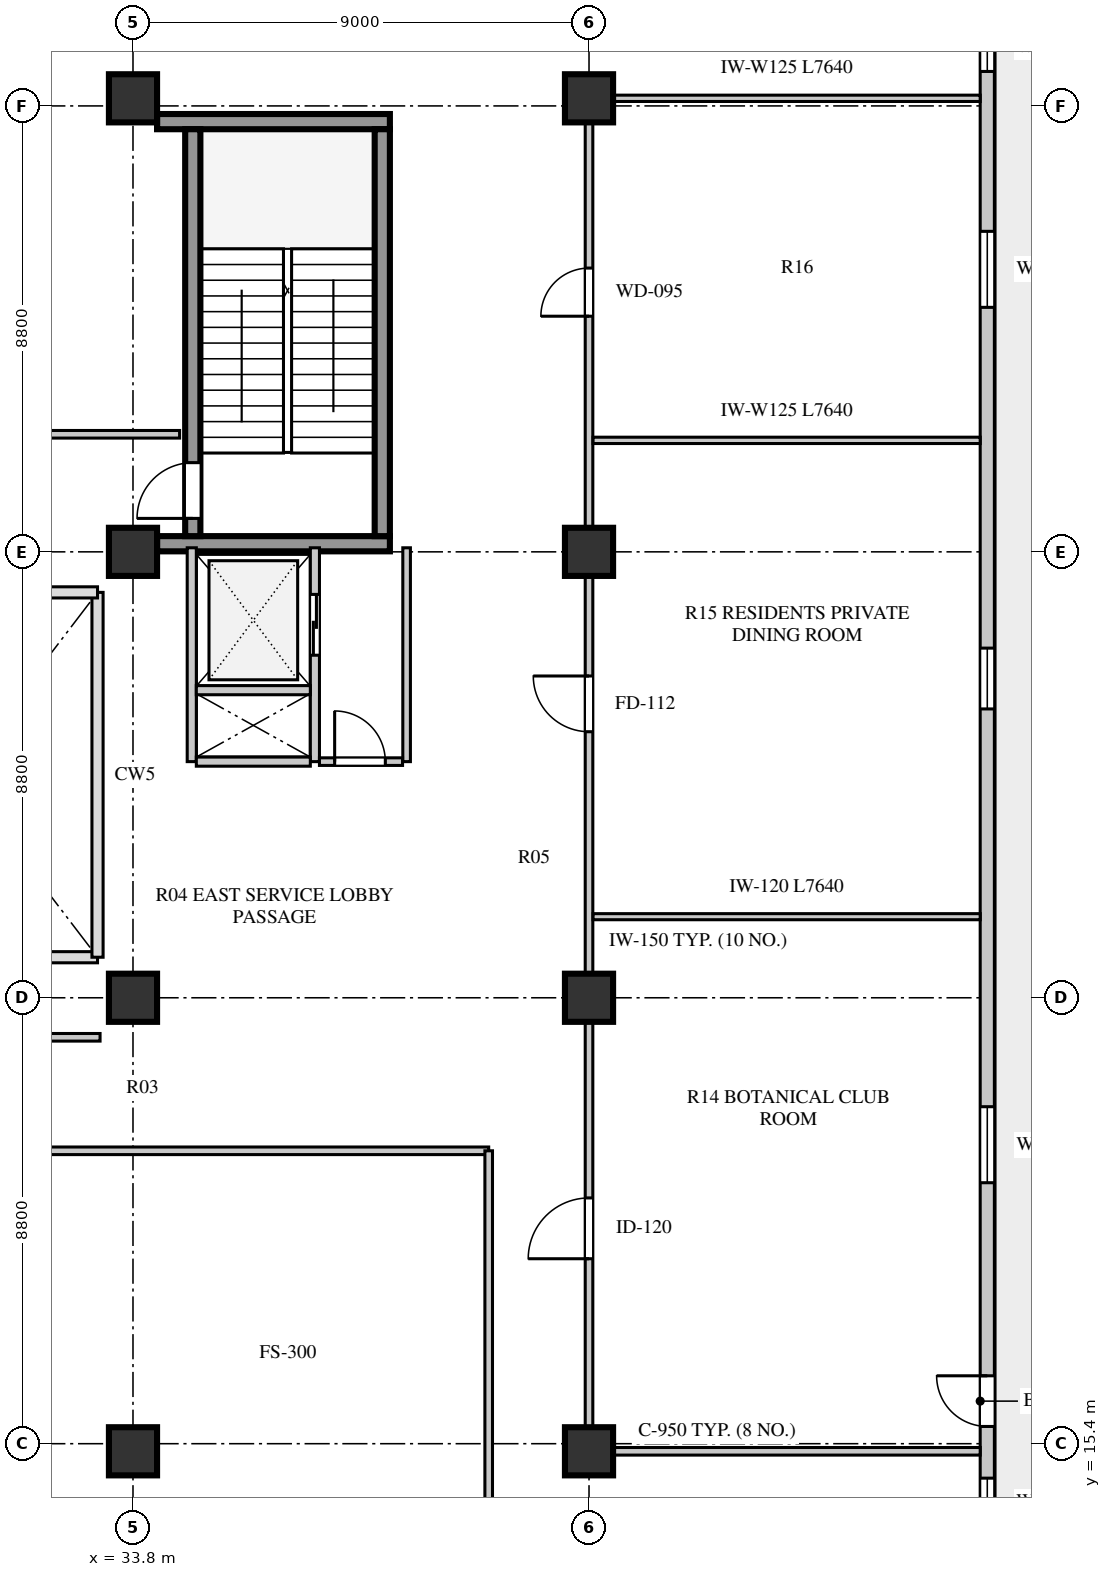
"""IFC4 building model, lengths in metres.
Left out: names, types, materials, properties, quantities, classifications, styles, units other than length and angle.
Written with IfcOpenShell. Run it as: python <this file> out.ifc"""

import sys

from ifc_helpers import new_model, si_unit, direction, frame, frame_2d, origin, origin_2d, place, context, subcontext, project, spatial, rectangle, extrude, element, fill, save


model = new_model("IFC4")
c1 = context("Model", 3, precision=1e-05, world=origin(), true_north=direction((0.0, 1.0)))
c2 = subcontext(c1, "Body", "Model", "MODEL_VIEW")
j1 = project(units=[si_unit("LENGTHUNIT", "METRE"), si_unit("PLANEANGLEUNIT", "RADIAN")], contexts=[c1])
p1 = place(None, origin())
s1 = spatial("IfcSite", under=j1, at=p1, CompositionType="ELEMENT")
p2 = place(p1, origin())
s2 = spatial("IfcBuilding", under=s1, at=p2, CompositionType="ELEMENT")
p3 = place(p2, frame((0.0, 0.0, 208.9)))
s3 = spatial("IfcBuildingStorey", under=s2, at=p3, CompositionType="ELEMENT", Elevation=208.9)
for number, where, z_axis, x_axis in (
    (1, (34.275, 33.16, 0.0), (0.0, 0.0, 1.0), (1.0, 0.0, 0.0)),
    (2, (34.275, 41.49, 0.0), (0.0, 0.0, 1.0), (1.0, 0.0, 0.0)),
):
    element("IfcWall", number, at=place(p3, frame(where, z_axis=z_axis, x_axis=x_axis)), inside=s3, PredefinedType="SHEAR", context=c2, shape_type="SweptSolid", body=[
        extrude(rectangle(XDim=4.595, YDim=0.3, at=frame_2d((2.298, 0.0))), origin(), (0.0, 0.0, 1.0), 4.96),
    ])
p4 = place(p3, frame((34.98, 33.31, 0.0), z_axis=(0.0, 0.0, 1.0), x_axis=(0.0, 1.0, 0.0)))
e3 = element("IfcWall", 3, at=p4, inside=s3, PredefinedType="SHEAR", context=c2, shape_type="SweptSolid", body=[
    extrude(rectangle(XDim=8.03, YDim=0.3, at=frame_2d((4.015, 0.0))), origin(), (0.0, 0.0, 1.0), 4.96),
])
p5 = place(p4, frame((0.35, 0.0, 0.0)))
e4 = element("IfcOpeningElement", 4, at=p5, cuts=e3, PredefinedType="OPENING", context=c2, shape_type="SweptSolid", body=[
    extrude(rectangle(XDim=1.1, YDim=2.1, at=frame_2d((0.55, 1.05))), frame((0.0, 0.16, 0.0), z_axis=(0.0, -1.0, 0.0), x_axis=(1.0, 0.0, 0.0)), (0.0, 0.0, 1.0), 0.32),
])
p6 = place(p3, frame((38.72, 33.31, 0.0), z_axis=(0.0, 0.0, 1.0), x_axis=(0.0, 1.0, 0.0)))
e5 = element("IfcWall", 5, at=p6, inside=s3, PredefinedType="SHEAR", context=c2, shape_type="SweptSolid", body=[
    extrude(rectangle(XDim=8.03, YDim=0.3, at=frame_2d((4.015, 0.0))), origin(), (0.0, 0.0, 1.0), 4.96),
])
for number, where, z_axis, x_axis in (
    (6, (33.8, 15.25, 0.0), (0.0, 0.0, 1.0), (1.0, 0.0, 0.0)),
    (7, (33.8, 24.2, 0.0), (0.0, 0.0, 1.0), (1.0, 0.0, 0.0)),
    (8, (33.8, 33.0, 0.0), (0.0, 0.0, 1.0), (1.0, 0.0, 0.0)),
    (9, (33.8, 41.95, 0.0), (0.0, 0.0, 1.0), (1.0, 0.0, 0.0)),
    (10, (42.8, 15.25, 0.0), (0.0, 0.0, 1.0), (1.0, 0.0, 0.0)),
    (11, (42.8, 24.2, 0.0), (0.0, 0.0, 1.0), (1.0, 0.0, 0.0)),
    (12, (42.8, 33.0, 0.0), (0.0, 0.0, 1.0), (1.0, 0.0, 0.0)),
    (13, (42.8, 41.95, 0.0), (0.0, 0.0, 1.0), (1.0, 0.0, 0.0)),
):
    element("IfcColumn", number, at=place(p3, frame(where, z_axis=z_axis, x_axis=x_axis)), inside=s3, PredefinedType="COLUMN", context=c2, shape_type="SweptSolid", body=[
        extrude(rectangle(XDim=0.95, YDim=0.95, at=origin_2d()), origin(), (0.0, 0.0, 1.0), 4.96),
    ])
p7 = place(p3, frame((50.66, 13.13, 0.0), z_axis=(0.0, 0.0, 1.0), x_axis=(0.0, 1.0, 0.0)))
e14 = element("IfcWall", 14, at=p7, inside=s3, PredefinedType="STANDARD", context=c2, shape_type="SweptSolid", body=[
    extrude(rectangle(XDim=30.94, YDim=0.28, at=frame_2d((15.47, 0.0))), origin(), (0.0, 0.0, 1.0), 4.96),
])
p8 = place(p7, frame((0.64, 0.0, 0.65)))
e15 = element("IfcOpeningElement", 15, at=p8, cuts=e14, PredefinedType="OPENING", context=c2, shape_type="SweptSolid", body=[
    extrude(rectangle(XDim=0.95, YDim=1.65, at=frame_2d((0.475, 0.825))), frame((0.0, 0.15, 0.0), z_axis=(0.0, -1.0, 0.0), x_axis=(1.0, 0.0, 0.0)), (0.0, 0.0, 1.0), 0.3),
])
p9 = place(p7, frame((2.61, 0.0, 0.0)))
e16 = element("IfcOpeningElement", 16, at=p9, cuts=e14, PredefinedType="OPENING", context=c2, shape_type="SweptSolid", body=[
    extrude(rectangle(XDim=1.0, YDim=2.05, at=frame_2d((0.5, 1.025))), frame((0.0, 0.15, 0.0), z_axis=(0.0, -1.0, 0.0), x_axis=(1.0, 0.0, 0.0)), (0.0, 0.0, 1.0), 0.3),
])
p10 = place(p7, frame((7.42, 0.0, 0.65)))
e17 = element("IfcOpeningElement", 17, at=p10, cuts=e14, PredefinedType="OPENING", context=c2, shape_type="SweptSolid", body=[
    extrude(rectangle(XDim=1.5, YDim=1.3, at=frame_2d((0.75, 0.65))), frame((0.0, 0.15, 0.0), z_axis=(0.0, -1.0, 0.0), x_axis=(1.0, 0.0, 0.0)), (0.0, 0.0, 1.0), 0.3),
])
p11 = place(p7, frame((16.77, 0.0, 0.65)))
e18 = element("IfcOpeningElement", 18, at=p11, cuts=e14, PredefinedType="OPENING", context=c2, shape_type="SweptSolid", body=[
    extrude(rectangle(XDim=1.2, YDim=1.25, at=frame_2d((0.6, 0.625))), frame((0.0, 0.15, 0.0), z_axis=(0.0, -1.0, 0.0), x_axis=(1.0, 0.0, 0.0)), (0.0, 0.0, 1.0), 0.3),
])
p12 = place(p7, frame((24.695, 0.0, 0.65)))
e19 = element("IfcOpeningElement", 19, at=p12, cuts=e14, PredefinedType="OPENING", context=c2, shape_type="SweptSolid", body=[
    extrude(rectangle(XDim=1.5, YDim=1.3, at=frame_2d((0.75, 0.65))), frame((0.0, 0.15, 0.0), z_axis=(0.0, -1.0, 0.0), x_axis=(1.0, 0.0, 0.0)), (0.0, 0.0, 1.0), 0.3),
])
p13 = place(p7, frame((29.35, 0.0, 0.65)))
e20 = element("IfcOpeningElement", 20, at=p13, cuts=e14, PredefinedType="OPENING", context=c2, shape_type="SweptSolid", body=[
    extrude(rectangle(XDim=0.95, YDim=1.65, at=frame_2d((0.475, 0.825))), frame((0.0, 0.15, 0.0), z_axis=(0.0, -1.0, 0.0), x_axis=(1.0, 0.0, 0.0)), (0.0, 0.0, 1.0), 0.3),
])
p14 = place(p3, frame((34.96, 28.86, 0.0), z_axis=(0.0, 0.0, 1.0), x_axis=(0.0, 1.0, 0.0)))
e21 = element("IfcWall", 21, at=p14, inside=s3, PredefinedType="SOLIDWALL", context=c2, shape_type="SweptSolid", body=[
    extrude(rectangle(XDim=4.22, YDim=0.18, at=frame_2d((2.11, 0.0))), origin(), (0.0, 0.0, 1.0), 4.96),
])
p15 = place(p3, frame((37.39, 28.86, 0.0), z_axis=(0.0, 0.0, 1.0), x_axis=(0.0, 1.0, 0.0)))
e22 = element("IfcWall", 22, at=p15, inside=s3, PredefinedType="SOLIDWALL", context=c2, shape_type="SweptSolid", body=[
    extrude(rectangle(XDim=4.22, YDim=0.18, at=frame_2d((2.11, 0.0))), origin(), (0.0, 0.0, 1.0), 4.96),
])
p16 = place(p15, frame((2.1, 0.0, 0.0)))
e23 = element("IfcOpeningElement", 23, at=p16, cuts=e22, PredefinedType="OPENING", context=c2, shape_type="SweptSolid", body=[
    extrude(rectangle(XDim=1.2, YDim=2.12, at=frame_2d((0.6, 1.06))), frame((0.0, 0.1, 0.0), z_axis=(0.0, -1.0, 0.0), x_axis=(1.0, 0.0, 0.0)), (0.0, 0.0, 1.0), 0.2),
])
for number, where, z_axis, x_axis in (
    (24, (35.05, 28.86, 0.0), (0.0, 0.0, 1.0), (1.0, 0.0, 0.0)),
    (25, (35.05, 30.27, 0.0), (0.0, 0.0, 1.0), (1.0, 0.0, 0.0)),
):
    element("IfcWall", number, at=place(p3, frame(where, z_axis=z_axis, x_axis=x_axis)), inside=s3, PredefinedType="SOLIDWALL", context=c2, shape_type="SweptSolid", body=[
        extrude(rectangle(XDim=2.25, YDim=0.18, at=frame_2d((1.125, 0.0))), origin(), (0.0, 0.0, 1.0), 4.96),
    ])
p17 = place(p3, frame((39.2, 28.86, 0.0), z_axis=(0.0, 0.0, 1.0), x_axis=(0.0, 1.0, 0.0)))
e26 = element("IfcWall", 26, at=p17, inside=s3, PredefinedType="PARTITIONING", context=c2, shape_type="SweptSolid", body=[
    extrude(rectangle(XDim=4.22, YDim=0.15, at=frame_2d((2.11, 0.0))), origin(), (0.0, 0.0, 1.0), 4.96),
])
p18 = place(p3, frame((37.48, 28.86, 0.0), z_axis=(0.0, 0.0, 1.0), x_axis=(1.0, 0.0, 0.0)))
e27 = element("IfcWall", 27, at=p18, inside=s3, PredefinedType="PARTITIONING", context=c2, shape_type="SweptSolid", body=[
    extrude(rectangle(XDim=1.64, YDim=0.15, at=frame_2d((0.82, 0.0))), origin(), (0.0, 0.0, 1.0), 4.96),
])
p19 = place(p18, frame((0.3, 0.0, 0.0)))
e28 = element("IfcOpeningElement", 28, at=p19, cuts=e27, PredefinedType="OPENING", context=c2, shape_type="SweptSolid", body=[
    extrude(rectangle(XDim=1.0, YDim=2.1, at=frame_2d((0.5, 1.05))), frame((0.0, 0.085, 0.0), z_axis=(0.0, -1.0, 0.0), x_axis=(1.0, 0.0, 0.0)), (0.0, 0.0, 1.0), 0.17),
])
p20 = place(p3, frame((25.22, 21.18, 0.0), z_axis=(0.0, 0.0, 1.0), x_axis=(1.0, 0.0, 0.0)))
e29 = element("IfcWall", 29, at=p20, inside=s3, PredefinedType="PARTITIONING", context=c2, shape_type="SweptSolid", body=[
    extrude(rectangle(XDim=15.6, YDim=0.15, at=frame_2d((7.8, 0.0))), origin(), (0.0, 0.0, 1.0), 4.61),
])
p21 = place(p20, frame((5.4, 0.0, 0.0)))
e30 = element("IfcOpeningElement", 30, at=p21, cuts=e29, PredefinedType="OPENING", context=c2, shape_type="SweptSolid", body=[
    extrude(rectangle(XDim=1.35, YDim=2.1, at=frame_2d((0.675, 1.05))), frame((0.0, 0.085, 0.0), z_axis=(0.0, -1.0, 0.0), x_axis=(1.0, 0.0, 0.0)), (0.0, 0.0, 1.0), 0.17),
])
p22 = place(p3, frame((27.5, 23.42, 0.0), z_axis=(0.0, 0.0, 1.0), x_axis=(1.0, 0.0, 0.0)))
e31 = element("IfcWall", 31, at=p22, inside=s3, PredefinedType="PARTITIONING", context=c2, shape_type="SweptSolid", body=[
    extrude(rectangle(XDim=5.65, YDim=0.15, at=frame_2d((2.825, 0.0))), origin(), (0.0, 0.0, 1.0), 4.96),
])
p23 = place(p3, frame((27.5, 35.32, 0.0), z_axis=(0.0, 0.0, 1.0), x_axis=(1.0, 0.0, 0.0)))
e32 = element("IfcWall", 32, at=p23, inside=s3, PredefinedType="PARTITIONING", context=c2, shape_type="SweptSolid", body=[
    extrude(rectangle(XDim=7.22, YDim=0.15, at=frame_2d((3.61, 0.0))), origin(), (0.0, 0.0, 1.0), 4.96),
])
p24 = place(p23, frame((2.4, 0.0, 0.0)))
e33 = element("IfcOpeningElement", 33, at=p24, cuts=e32, PredefinedType="OPENING", context=c2, shape_type="SweptSolid", body=[
    extrude(rectangle(XDim=1.2, YDim=2.1, at=frame_2d((0.6, 1.05))), frame((0.0, 0.085, 0.0), z_axis=(0.0, -1.0, 0.0), x_axis=(1.0, 0.0, 0.0)), (0.0, 0.0, 1.0), 0.17),
])
p25 = place(p3, frame((42.8, 15.25, 0.0), z_axis=(0.0, 0.0, 1.0), x_axis=(0.0, 1.0, 0.0)))
e34 = element("IfcWall", 34, at=p25, inside=s3, PredefinedType="PARTITIONING", context=c2, shape_type="SweptSolid", body=[
    extrude(rectangle(XDim=26.7, YDim=0.15, at=frame_2d((13.35, 0.0))), origin(), (0.0, 0.0, 1.0), 4.31),
])
p26 = place(p25, frame((3.8, 0.0, 0.0)))
e35 = element("IfcOpeningElement", 35, at=p26, cuts=e34, PredefinedType="OPENING", context=c2, shape_type="SweptSolid", body=[
    extrude(rectangle(XDim=1.2, YDim=2.1, at=frame_2d((0.6, 1.05))), frame((0.0, 0.085, 0.0), z_axis=(0.0, -1.0, 0.0), x_axis=(1.0, 0.0, 0.0)), (0.0, 0.0, 1.0), 0.17),
])
p27 = place(p25, frame((14.2, 0.0, 0.0)))
e36 = element("IfcOpeningElement", 36, at=p27, cuts=e34, PredefinedType="OPENING", context=c2, shape_type="SweptSolid", body=[
    extrude(rectangle(XDim=1.1, YDim=2.12, at=frame_2d((0.55, 1.06))), frame((0.0, 0.085, 0.0), z_axis=(0.0, -1.0, 0.0), x_axis=(1.0, 0.0, 0.0)), (0.0, 0.0, 1.0), 0.17),
])
p28 = place(p25, frame((22.4, 0.0, 0.0)))
e37 = element("IfcOpeningElement", 37, at=p28, cuts=e34, PredefinedType="OPENING", context=c2, shape_type="SweptSolid", body=[
    extrude(rectangle(XDim=0.95, YDim=2.05, at=frame_2d((0.475, 1.025))), frame((0.0, 0.085, 0.0), z_axis=(0.0, -1.0, 0.0), x_axis=(1.0, 0.0, 0.0)), (0.0, 0.0, 1.0), 0.17),
])
p29 = place(p3, frame((42.88, 15.25, 0.0), z_axis=(0.0, 0.0, 1.0), x_axis=(1.0, 0.0, 0.0)))
e38 = element("IfcWall", 38, at=p29, inside=s3, PredefinedType="PARTITIONING", context=c2, shape_type="SweptSolid", body=[
    extrude(rectangle(XDim=7.64, YDim=0.15, at=frame_2d((3.82, 0.0))), origin(), (0.0, 0.0, 1.0), 3.88),
])
p30 = place(p3, frame((42.88, 41.95, 0.0), z_axis=(0.0, 0.0, 1.0), x_axis=(1.0, 0.0, 0.0)))
e39 = element("IfcWall", 39, at=p30, inside=s3, PredefinedType="PLUMBINGWALL", context=c2, shape_type="SweptSolid", body=[
    extrude(rectangle(XDim=7.64, YDim=0.125, at=frame_2d((3.82, 0.0))), origin(), (0.0, 0.0, 1.0), 3.88),
])
p31 = place(p3, frame((42.88, 25.8, 0.0), z_axis=(0.0, 0.0, 1.0), x_axis=(1.0, 0.0, 0.0)))
e40 = element("IfcWall", 40, at=p31, inside=s3, PredefinedType="PARTITIONING", context=c2, shape_type="SweptSolid", body=[
    extrude(rectangle(XDim=7.64, YDim=0.12, at=frame_2d((3.82, 0.0))), origin(), (0.0, 0.0, 1.0), 4.96),
])
p32 = place(p3, frame((42.88, 35.2, 0.0), z_axis=(0.0, 0.0, 1.0), x_axis=(1.0, 0.0, 0.0)))
e41 = element("IfcWall", 41, at=p32, inside=s3, PredefinedType="PLUMBINGWALL", context=c2, shape_type="SweptSolid", body=[
    extrude(rectangle(XDim=7.64, YDim=0.125, at=frame_2d((3.82, 0.0))), origin(), (0.0, 0.0, 1.0), 4.96),
])
p33 = place(p3, frame((40.82, 7.88, 0.0), z_axis=(0.0, 0.0, 1.0), x_axis=(0.0, 1.0, 0.0)))
e42 = element("IfcWall", 42, at=p33, inside=s3, PredefinedType="PARTITIONING", context=c2, shape_type="SweptSolid", body=[
    extrude(rectangle(XDim=13.3, YDim=0.15, at=frame_2d((6.65, 0.0))), origin(), (0.0, 0.0, 1.0), 4.96),
])
p34 = place(p8, origin())
e43 = element("IfcWindow", 43, at=p34, inside=s3, PartitioningType="SINGLE_PANEL", PredefinedType="WINDOW", context=c2, shape_type="SweptSolid", body=[
    extrude(rectangle(XDim=0.95, YDim=1.65, at=frame_2d((0.475, 0.825))), frame((0.0, 0.03, 0.0), z_axis=(0.0, -1.0, 0.0), x_axis=(1.0, 0.0, 0.0)), (0.0, 0.0, 1.0), 0.06),
])
fill(e15, e43)
p35 = place(p9, frame((1.0, 0.0, 0.0), z_axis=(0.0, 0.0, 1.0), x_axis=(-1.0, 0.0, 0.0)))
e44 = element("IfcDoor", 44, at=p35, inside=s3, OperationType="SINGLE_SWING_LEFT", PredefinedType="DOOR", context=c2, shape_type="SweptSolid", body=[
    extrude(rectangle(XDim=1.0, YDim=2.05, at=frame_2d((0.5, 1.025))), frame((0.0, 0.025, 0.0), z_axis=(0.0, -1.0, 0.0), x_axis=(1.0, 0.0, 0.0)), (0.0, 0.0, 1.0), 0.05),
])
fill(e16, e44)
p36 = place(p10, origin())
e45 = element("IfcWindow", 45, at=p36, inside=s3, PartitioningType="SINGLE_PANEL", PredefinedType="WINDOW", context=c2, shape_type="SweptSolid", body=[
    extrude(rectangle(XDim=1.5, YDim=1.3, at=frame_2d((0.75, 0.65))), frame((0.0, 0.03, 0.0), z_axis=(0.0, -1.0, 0.0), x_axis=(1.0, 0.0, 0.0)), (0.0, 0.0, 1.0), 0.06),
])
fill(e17, e45)
p37 = place(p11, origin())
e46 = element("IfcWindow", 46, at=p37, inside=s3, PartitioningType="SINGLE_PANEL", PredefinedType="WINDOW", context=c2, shape_type="SweptSolid", body=[
    extrude(rectangle(XDim=1.2, YDim=1.25, at=frame_2d((0.6, 0.625))), frame((0.0, 0.03, 0.0), z_axis=(0.0, -1.0, 0.0), x_axis=(1.0, 0.0, 0.0)), (0.0, 0.0, 1.0), 0.06),
])
fill(e18, e46)
p38 = place(p12, origin())
e47 = element("IfcWindow", 47, at=p38, inside=s3, PartitioningType="SINGLE_PANEL", PredefinedType="WINDOW", context=c2, shape_type="SweptSolid", body=[
    extrude(rectangle(XDim=1.5, YDim=1.3, at=frame_2d((0.75, 0.65))), frame((0.0, 0.03, 0.0), z_axis=(0.0, -1.0, 0.0), x_axis=(1.0, 0.0, 0.0)), (0.0, 0.0, 1.0), 0.06),
])
fill(e19, e47)
p39 = place(p13, origin())
e48 = element("IfcWindow", 48, at=p39, inside=s3, PartitioningType="SINGLE_PANEL", PredefinedType="WINDOW", context=c2, shape_type="SweptSolid", body=[
    extrude(rectangle(XDim=0.95, YDim=1.65, at=frame_2d((0.475, 0.825))), frame((0.0, 0.03, 0.0), z_axis=(0.0, -1.0, 0.0), x_axis=(1.0, 0.0, 0.0)), (0.0, 0.0, 1.0), 0.06),
])
fill(e20, e48)
p40 = place(p5, origin())
e49 = element("IfcDoor", 49, at=p40, inside=s3, OperationType="SINGLE_SWING_LEFT", PredefinedType="DOOR", context=c2, shape_type="SweptSolid", body=[
    extrude(rectangle(XDim=1.1, YDim=2.1, at=frame_2d((0.55, 1.05))), frame((0.0, 0.025, 0.0), z_axis=(0.0, -1.0, 0.0), x_axis=(1.0, 0.0, 0.0)), (0.0, 0.0, 1.0), 0.05),
])
fill(e4, e49)
p41 = place(p16, frame((1.2, 0.0, 0.0), z_axis=(0.0, 0.0, 1.0), x_axis=(-1.0, 0.0, 0.0)))
e50 = element("IfcDoor", 50, at=p41, inside=s3, OperationType="DOUBLE_DOOR_SLIDING", PredefinedType="DOOR", context=c2, shape_type="SweptSolid", body=[
    extrude(rectangle(XDim=1.2, YDim=2.12, at=frame_2d((0.6, 1.06))), frame((0.0, 0.025, 0.0), z_axis=(0.0, -1.0, 0.0), x_axis=(1.0, 0.0, 0.0)), (0.0, 0.0, 1.0), 0.05),
])
fill(e23, e50)
p42 = place(p19, origin())
e51 = element("IfcDoor", 51, at=p42, inside=s3, OperationType="SINGLE_SWING_LEFT", PredefinedType="DOOR", context=c2, shape_type="SweptSolid", body=[
    extrude(rectangle(XDim=1.0, YDim=2.1, at=frame_2d((0.5, 1.05))), frame((0.0, 0.025, 0.0), z_axis=(0.0, -1.0, 0.0), x_axis=(1.0, 0.0, 0.0)), (0.0, 0.0, 1.0), 0.05),
])
fill(e28, e51)
p43 = place(p26, origin())
e52 = element("IfcDoor", 52, at=p43, inside=s3, OperationType="SINGLE_SWING_LEFT", PredefinedType="DOOR", context=c2, shape_type="SweptSolid", body=[
    extrude(rectangle(XDim=1.2, YDim=2.1, at=frame_2d((0.6, 1.05))), frame((0.0, 0.025, 0.0), z_axis=(0.0, -1.0, 0.0), x_axis=(1.0, 0.0, 0.0)), (0.0, 0.0, 1.0), 0.05),
])
fill(e35, e52)
p44 = place(p27, origin())
e53 = element("IfcDoor", 53, at=p44, inside=s3, OperationType="SINGLE_SWING_RIGHT", PredefinedType="DOOR", context=c2, shape_type="SweptSolid", body=[
    extrude(rectangle(XDim=1.1, YDim=2.12, at=frame_2d((0.55, 1.06))), frame((0.0, 0.025, 0.0), z_axis=(0.0, -1.0, 0.0), x_axis=(1.0, 0.0, 0.0)), (0.0, 0.0, 1.0), 0.05),
])
fill(e36, e53)
p45 = place(p28, origin())
e54 = element("IfcDoor", 54, at=p45, inside=s3, OperationType="SINGLE_SWING_LEFT", PredefinedType="DOOR", context=c2, shape_type="SweptSolid", body=[
    extrude(rectangle(XDim=0.95, YDim=2.05, at=frame_2d((0.475, 1.025))), frame((0.0, 0.025, 0.0), z_axis=(0.0, -1.0, 0.0), x_axis=(1.0, 0.0, 0.0)), (0.0, 0.0, 1.0), 0.05),
])
fill(e37, e54)
save(model, sys.argv[1])
